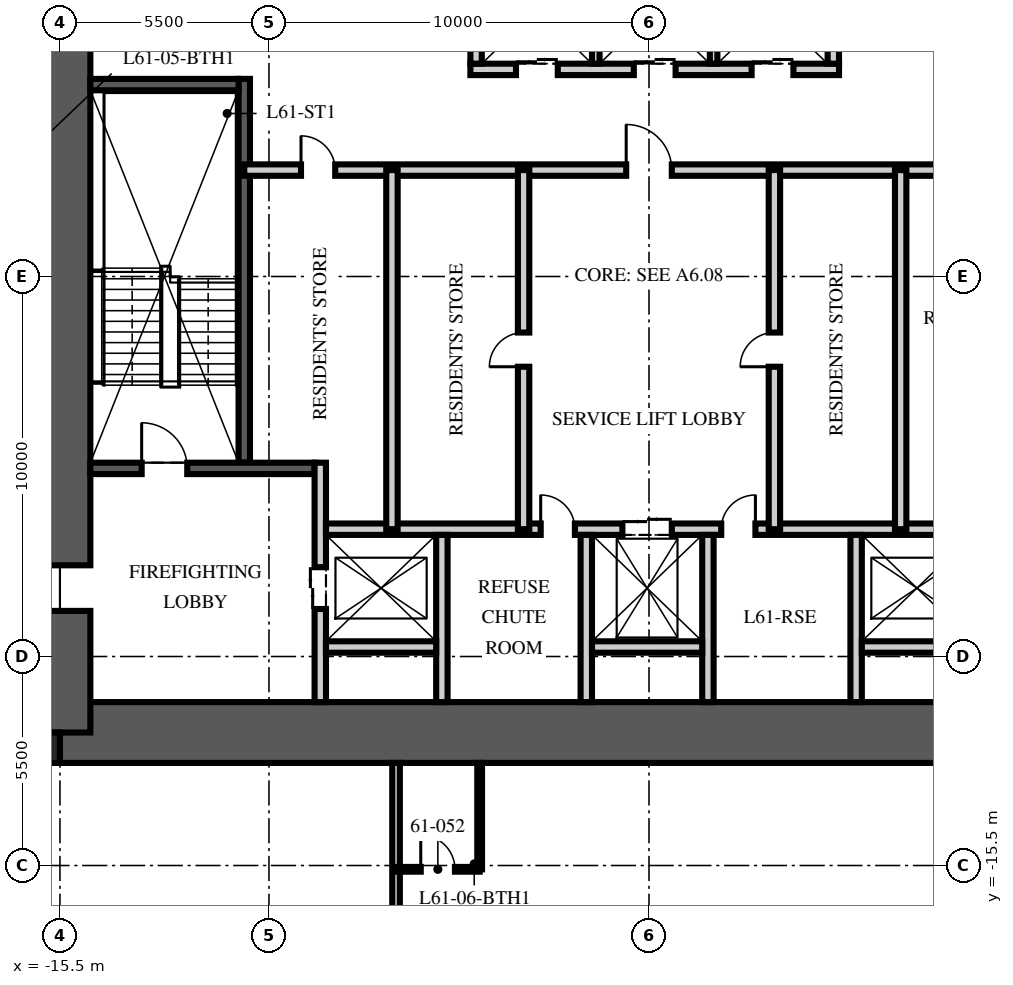
"""IFC4 building model, lengths in metres.
Left out: names, types, materials, properties, quantities, classifications, styles, units other than length and angle.
Written with IfcOpenShell. Run it as: python <this file> out.ifc"""

import sys

from ifc_helpers import new_model, si_unit, direction, frame, frame_2d, origin, origin_2d, place, context, subcontext, project, spatial, rectangle, extrude, element, fill, save


model = new_model("IFC4")
c1 = context("Model", 3, precision=1e-05, world=origin(), true_north=direction((0.0, 1.0)))
c2 = subcontext(c1, "Body", "Model", "MODEL_VIEW")
j1 = project(units=[si_unit("LENGTHUNIT", "METRE"), si_unit("PLANEANGLEUNIT", "RADIAN")], contexts=[c1])
p1 = place(None, origin())
s1 = spatial("IfcSite", under=j1, at=p1, CompositionType="ELEMENT")
p2 = place(p1, origin())
s2 = spatial("IfcBuilding", under=s1, at=p2, CompositionType="ELEMENT")
p3 = place(p2, frame((0.0, 0.0, 244.5)))
s3 = spatial("IfcBuildingStorey", under=s2, at=p3, CompositionType="ELEMENT", Elevation=244.5)
p4 = place(p3, frame((-15.5, -12.0, -0.25), z_axis=(0.0, 0.0, 1.0), x_axis=(1.0, 0.0, 0.0)))
e1 = element("IfcWall", 1, at=p4, inside=s3, PredefinedType="SHEAR", context=c2, shape_type="SweptSolid", body=[
    extrude(rectangle(XDim=31.0, YDim=1.6, at=frame_2d((15.5, 0.0))), origin(), (0.0, 0.0, 1.0), 3.75),
])
p5 = place(p3, frame((-15.5, -12.0, -0.25), z_axis=(0.0, 0.0, 1.0), x_axis=(0.0, 1.0, 0.0)))
e2 = element("IfcWall", 2, at=p5, inside=s3, PredefinedType="SHEAR", context=c2, shape_type="SweptSolid", body=[
    extrude(rectangle(XDim=24.0, YDim=1.6, at=frame_2d((12.0, 0.0))), origin(), (0.0, 0.0, 1.0), 3.75),
])
p6 = place(p5, frame((3.2, 0.0, 0.25)))
e3 = element("IfcOpeningElement", 3, at=p6, cuts=e2, PredefinedType="OPENING", context=c2, shape_type="SweptSolid", body=[
    extrude(rectangle(XDim=1.2, YDim=2.1, at=frame_2d((0.6, 1.05))), frame((0.0, 0.81, 0.0), z_axis=(0.0, -1.0, 0.0), x_axis=(1.0, 0.0, 0.0)), (0.0, 0.0, 1.0), 1.62),
])
p7 = place(p5, frame((19.3, 0.0, 0.25)))
e4 = element("IfcOpeningElement", 4, at=p7, cuts=e2, PredefinedType="OPENING", context=c2, shape_type="SweptSolid", body=[
    extrude(rectangle(XDim=1.8, YDim=2.1, at=frame_2d((0.9, 1.05))), frame((0.0, 0.81, 0.0), z_axis=(0.0, -1.0, 0.0), x_axis=(1.0, 0.0, 0.0)), (0.0, 0.0, 1.0), 1.62),
])
p8 = place(p3, frame((-15.9, -12.4, -0.25), z_axis=(0.0, 0.0, 1.0), x_axis=(1.0, 0.0, 0.0)))
e5 = element("IfcColumn", 5, at=p8, inside=s3, PredefinedType="COLUMN", context=c2, shape_type="SweptSolid", body=[
    extrude(rectangle(XDim=0.8, YDim=0.8, at=origin_2d()), origin(), (0.0, 0.0, 1.0), 3.75),
])
p9 = place(p3, frame((-10.65, -4.9, 0.0), z_axis=(0.0, 0.0, 1.0), x_axis=(0.0, 1.0, 0.0)))
e6 = element("IfcWall", 6, at=p9, inside=s3, PredefinedType="SOLIDWALL", context=c2, shape_type="SweptSolid", body=[
    extrude(rectangle(XDim=10.1, YDim=0.3, at=frame_2d((5.05, 0.0))), origin(), (0.0, 0.0, 1.0), 3.5),
])
p10 = place(p3, frame((-14.7, -5.05, 0.0), z_axis=(0.0, 0.0, 1.0), x_axis=(1.0, 0.0, 0.0)))
e7 = element("IfcWall", 7, at=p10, inside=s3, PredefinedType="SOLIDWALL", context=c2, shape_type="SweptSolid", body=[
    extrude(rectangle(XDim=5.9, YDim=0.3, at=frame_2d((2.95, 0.0))), origin(), (0.0, 0.0, 1.0), 3.5),
])
p11 = place(p10, frame((1.35, 0.0, 0.0)))
e8 = element("IfcOpeningElement", 8, at=p11, cuts=e7, PredefinedType="OPENING", context=c2, shape_type="SweptSolid", body=[
    extrude(rectangle(XDim=1.2, YDim=2.1, at=frame_2d((0.6, 1.05))), frame((0.0, 0.16, 0.0), z_axis=(0.0, -1.0, 0.0), x_axis=(1.0, 0.0, 0.0)), (0.0, 0.0, 1.0), 0.32),
])
p12 = place(p3, frame((-14.7, 5.05, 0.0), z_axis=(0.0, 0.0, 1.0), x_axis=(1.0, 0.0, 0.0)))
e9 = element("IfcWall", 9, at=p12, inside=s3, PredefinedType="SOLIDWALL", context=c2, shape_type="SweptSolid", body=[
    extrude(rectangle(XDim=3.9, YDim=0.3, at=frame_2d((1.95, 0.0))), origin(), (0.0, 0.0, 1.0), 3.5),
])
p13 = place(p3, frame((-8.65, -11.2, 0.0), z_axis=(0.0, 0.0, 1.0), x_axis=(0.0, 1.0, 0.0)))
e10 = element("IfcWall", 10, at=p13, inside=s3, PredefinedType="PARTITIONING", context=c2, shape_type="SweptSolid", body=[
    extrude(rectangle(XDim=6.3, YDim=0.3, at=frame_2d((3.15, 0.0))), origin(), (0.0, 0.0, 1.0), 3.5),
])
p14 = place(p13, frame((2.45, 0.0, 0.0)))
e11 = element("IfcOpeningElement", 11, at=p14, cuts=e10, PredefinedType="OPENING", context=c2, shape_type="SweptSolid", body=[
    extrude(rectangle(XDim=1.1, YDim=2.1, at=frame_2d((0.55, 1.05))), frame((0.0, 0.16, 0.0), z_axis=(0.0, -1.0, 0.0), x_axis=(1.0, 0.0, 0.0)), (0.0, 0.0, 1.0), 0.32),
])
p15 = place(p3, frame((-8.5, -6.65, 0.0), z_axis=(0.0, 0.0, 1.0), x_axis=(1.0, 0.0, 0.0)))
e12 = element("IfcWall", 12, at=p15, inside=s3, PredefinedType="PARTITIONING", context=c2, shape_type="SweptSolid", body=[
    extrude(rectangle(XDim=17.0, YDim=0.3, at=frame_2d((8.5, 0.0))), origin(), (0.0, 0.0, 1.0), 3.5),
])
p16 = place(p15, frame((7.8, 0.0, 0.0)))
e13 = element("IfcOpeningElement", 13, at=p16, cuts=e12, PredefinedType="OPENING", context=c2, shape_type="SweptSolid", body=[
    extrude(rectangle(XDim=1.3, YDim=2.4, at=frame_2d((0.65, 1.2))), frame((0.0, 0.16, 0.0), z_axis=(0.0, -1.0, 0.0), x_axis=(1.0, 0.0, 0.0)), (0.0, 0.0, 1.0), 0.32),
])
p17 = place(p15, frame((5.65, 0.0, 0.0)))
e14 = element("IfcOpeningElement", 14, at=p17, cuts=e12, PredefinedType="OPENING", context=c2, shape_type="SweptSolid", body=[
    extrude(rectangle(XDim=0.9, YDim=2.1, at=frame_2d((0.45, 1.05))), frame((0.0, 0.16, 0.0), z_axis=(0.0, -1.0, 0.0), x_axis=(1.0, 0.0, 0.0)), (0.0, 0.0, 1.0), 0.32),
])
p18 = place(p15, frame((10.4, 0.0, 0.0)))
e15 = element("IfcOpeningElement", 15, at=p18, cuts=e12, PredefinedType="OPENING", context=c2, shape_type="SweptSolid", body=[
    extrude(rectangle(XDim=0.9, YDim=2.1, at=frame_2d((0.45, 1.05))), frame((0.0, 0.16, 0.0), z_axis=(0.0, -1.0, 0.0), x_axis=(1.0, 0.0, 0.0)), (0.0, 0.0, 1.0), 0.32),
])
for number, where, z_axis, x_axis in (
    (16, (-5.45, -11.2, 0.0), (0.0, 0.0, 1.0), (0.0, 1.0, 0.0)),
    (17, (-1.65, -11.2, 0.0), (0.0, 0.0, 1.0), (0.0, 1.0, 0.0)),
    (18, (1.55, -11.2, 0.0), (0.0, 0.0, 1.0), (0.0, 1.0, 0.0)),
    (19, (5.45, -11.2, 0.0), (0.0, 0.0, 1.0), (0.0, 1.0, 0.0)),
):
    element("IfcWall", number, at=place(p3, frame(where, z_axis=z_axis, x_axis=x_axis)), inside=s3, PredefinedType="PARTITIONING", context=c2, shape_type="SweptSolid", body=[
        extrude(rectangle(XDim=4.4, YDim=0.3, at=frame_2d((2.2, 0.0))), origin(), (0.0, 0.0, 1.0), 3.5),
    ])
for number, where, z_axis, x_axis in (
    (20, (-8.5, -9.75, 0.0), (0.0, 0.0, 1.0), (1.0, 0.0, 0.0)),
    (21, (-1.5, -9.75, 0.0), (0.0, 0.0, 1.0), (1.0, 0.0, 0.0)),
    (22, (5.6, -9.75, 0.0), (0.0, 0.0, 1.0), (1.0, 0.0, 0.0)),
):
    element("IfcWall", number, at=place(p3, frame(where, z_axis=z_axis, x_axis=x_axis)), inside=s3, PredefinedType="PARTITIONING", context=c2, shape_type="SweptSolid", body=[
        extrude(rectangle(XDim=2.9, YDim=0.3, at=frame_2d((1.45, 0.0))), origin(), (0.0, 0.0, 1.0), 3.5),
    ])
p19 = place(p3, frame((-4.7, 5.45, 0.0), z_axis=(0.0, 0.0, 1.0), x_axis=(1.0, 0.0, 0.0)))
e23 = element("IfcWall", 23, at=p19, inside=s3, PredefinedType="PARTITIONING", context=c2, shape_type="SweptSolid", body=[
    extrude(rectangle(XDim=9.7, YDim=0.3, at=frame_2d((4.85, 0.0))), origin(), (0.0, 0.0, 1.0), 3.5),
])
p20 = place(p19, frame((1.2, 0.0, 0.0)))
e24 = element("IfcOpeningElement", 24, at=p20, cuts=e23, PredefinedType="OPENING", context=c2, shape_type="SweptSolid", body=[
    extrude(rectangle(XDim=1.1, YDim=2.1, at=frame_2d((0.55, 1.05))), frame((0.0, 0.16, 0.0), z_axis=(0.0, -1.0, 0.0), x_axis=(1.0, 0.0, 0.0)), (0.0, 0.0, 1.0), 0.32),
])
p21 = place(p19, frame((4.3, 0.0, 0.0)))
e25 = element("IfcOpeningElement", 25, at=p21, cuts=e23, PredefinedType="OPENING", context=c2, shape_type="SweptSolid", body=[
    extrude(rectangle(XDim=1.1, YDim=2.1, at=frame_2d((0.55, 1.05))), frame((0.0, 0.16, 0.0), z_axis=(0.0, -1.0, 0.0), x_axis=(1.0, 0.0, 0.0)), (0.0, 0.0, 1.0), 0.32),
])
p22 = place(p19, frame((7.4, 0.0, 0.0)))
e26 = element("IfcOpeningElement", 26, at=p22, cuts=e23, PredefinedType="OPENING", context=c2, shape_type="SweptSolid", body=[
    extrude(rectangle(XDim=1.1, YDim=2.1, at=frame_2d((0.55, 1.05))), frame((0.0, 0.16, 0.0), z_axis=(0.0, -1.0, 0.0), x_axis=(1.0, 0.0, 0.0)), (0.0, 0.0, 1.0), 0.32),
])
for number, where, z_axis, x_axis in (
    (27, (-4.55, 5.6, 0.0), (0.0, 0.0, 1.0), (0.0, 1.0, 0.0)),
    (28, (4.85, 5.6, 0.0), (0.0, 0.0, 1.0), (0.0, 1.0, 0.0)),
):
    element("IfcWall", number, at=place(p3, frame(where, z_axis=z_axis, x_axis=x_axis)), inside=s3, PredefinedType="PARTITIONING", context=c2, shape_type="SweptSolid", body=[
        extrude(rectangle(XDim=2.8, YDim=0.3, at=frame_2d((1.4, 0.0))), origin(), (0.0, 0.0, 1.0), 3.5),
    ])
for number, where, z_axis, x_axis in (
    (29, (-1.4, 5.6, 0.0), (0.0, 0.0, 1.0), (0.0, 1.0, 0.0)),
    (30, (1.7, 5.6, 0.0), (0.0, 0.0, 1.0), (0.0, 1.0, 0.0)),
):
    element("IfcWall", number, at=place(p3, frame(where, z_axis=z_axis, x_axis=x_axis)), inside=s3, PredefinedType="PARTITIONING", context=c2, shape_type="SweptSolid", body=[
        extrude(rectangle(XDim=2.8, YDim=0.2, at=frame_2d((1.4, 0.0))), origin(), (0.0, 0.0, 1.0), 3.5),
    ])
p23 = place(p3, frame((-10.65, 2.8, 0.0), z_axis=(0.0, 0.0, 1.0), x_axis=(1.0, 0.0, 0.0)))
e31 = element("IfcWall", 31, at=p23, inside=s3, PredefinedType="PARTITIONING", context=c2, shape_type="SweptSolid", body=[
    extrude(rectangle(XDim=21.3, YDim=0.3, at=frame_2d((10.65, 0.0))), origin(), (0.0, 0.0, 1.0), 3.5),
])
p24 = place(p23, frame((10.05, 0.0, 0.0)))
e32 = element("IfcOpeningElement", 32, at=p24, cuts=e31, PredefinedType="OPENING", context=c2, shape_type="SweptSolid", body=[
    extrude(rectangle(XDim=1.2, YDim=2.1, at=frame_2d((0.6, 1.05))), frame((0.0, 0.16, 0.0), z_axis=(0.0, -1.0, 0.0), x_axis=(1.0, 0.0, 0.0)), (0.0, 0.0, 1.0), 0.32),
])
p25 = place(p23, frame((1.493, 0.0, 0.0)))
e33 = element("IfcOpeningElement", 33, at=p25, cuts=e31, PredefinedType="OPENING", context=c2, shape_type="SweptSolid", body=[
    extrude(rectangle(XDim=0.9, YDim=2.1, at=frame_2d((0.45, 1.05))), frame((0.0, 0.16, 0.0), z_axis=(0.0, -1.0, 0.0), x_axis=(1.0, 0.0, 0.0)), (0.0, 0.0, 1.0), 0.32),
])
p26 = place(p23, frame((18.836, 0.0, 0.0)))
e34 = element("IfcOpeningElement", 34, at=p26, cuts=e31, PredefinedType="OPENING", context=c2, shape_type="SweptSolid", body=[
    extrude(rectangle(XDim=0.9, YDim=2.1, at=frame_2d((0.45, 1.05))), frame((0.0, 0.16, 0.0), z_axis=(0.0, -1.0, 0.0), x_axis=(1.0, 0.0, 0.0)), (0.0, 0.0, 1.0), 0.32),
])
p27 = place(p3, frame((-3.3, -6.65, 0.0), z_axis=(0.0, 0.0, 1.0), x_axis=(0.0, 1.0, 0.0)))
e35 = element("IfcWall", 35, at=p27, inside=s3, PredefinedType="PARTITIONING", context=c2, shape_type="SweptSolid", body=[
    extrude(rectangle(XDim=9.45, YDim=0.3, at=frame_2d((4.725, 0.0))), origin(), (0.0, 0.0, 1.0), 3.5),
])
p28 = place(p27, frame((4.275, 0.0, 0.0)))
e36 = element("IfcOpeningElement", 36, at=p28, cuts=e35, PredefinedType="OPENING", context=c2, shape_type="SweptSolid", body=[
    extrude(rectangle(XDim=0.9, YDim=2.1, at=frame_2d((0.45, 1.05))), frame((0.0, 0.16, 0.0), z_axis=(0.0, -1.0, 0.0), x_axis=(1.0, 0.0, 0.0)), (0.0, 0.0, 1.0), 0.32),
])
p29 = place(p3, frame((3.3, -6.65, 0.0), z_axis=(0.0, 0.0, 1.0), x_axis=(0.0, 1.0, 0.0)))
e37 = element("IfcWall", 37, at=p29, inside=s3, PredefinedType="PARTITIONING", context=c2, shape_type="SweptSolid", body=[
    extrude(rectangle(XDim=9.45, YDim=0.3, at=frame_2d((4.725, 0.0))), origin(), (0.0, 0.0, 1.0), 3.5),
])
p30 = place(p29, frame((4.275, 0.0, 0.0)))
e38 = element("IfcOpeningElement", 38, at=p30, cuts=e37, PredefinedType="OPENING", context=c2, shape_type="SweptSolid", body=[
    extrude(rectangle(XDim=0.9, YDim=2.1, at=frame_2d((0.45, 1.05))), frame((0.0, 0.16, 0.0), z_axis=(0.0, -1.0, 0.0), x_axis=(1.0, 0.0, 0.0)), (0.0, 0.0, 1.0), 0.32),
])
for number, where, z_axis, x_axis in (
    (39, (-6.764, -6.65, 0.0), (0.0, 0.0, 1.0), (0.0, 1.0, 0.0)),
    (40, (6.622, -6.65, 0.0), (0.0, 0.0, 1.0), (0.0, 1.0, 0.0)),
):
    element("IfcWall", number, at=place(p3, frame(where, z_axis=z_axis, x_axis=x_axis)), inside=s3, PredefinedType="PARTITIONING", context=c2, shape_type="SweptSolid", body=[
        extrude(rectangle(XDim=9.45, YDim=0.3, at=frame_2d((4.725, 0.0))), origin(), (0.0, 0.0, 1.0), 3.5),
    ])
p31 = place(p3, frame((-6.656, -12.8, 0.0), z_axis=(0.0, 0.0, 1.0), x_axis=(0.0, -1.0, 0.0)))
e41 = element("IfcWall", 41, at=p31, inside=s3, PredefinedType="PARTITIONING", context=c2, shape_type="SweptSolid", body=[
    extrude(rectangle(XDim=12.9, YDim=0.2, at=frame_2d((6.45, 0.0))), origin(), (0.0, 0.0, 1.0), 2.91),
])
p32 = place(p3, frame((-6.656, -15.6, 0.0), z_axis=(0.0, 0.0, 1.0), x_axis=(1.0, 0.0, 0.0)))
e42 = element("IfcWall", 42, at=p32, inside=s3, PredefinedType="PARTITIONING", context=c2, shape_type="SweptSolid", body=[
    extrude(rectangle(XDim=2.2, YDim=0.125, at=frame_2d((1.1, 0.0))), origin(), (0.0, 0.0, 1.0), 3.5),
])
p33 = place(p32, frame((0.65, 0.0, 0.0)))
e43 = element("IfcOpeningElement", 43, at=p33, cuts=e42, PredefinedType="OPENING", context=c2, shape_type="SweptSolid", body=[
    extrude(rectangle(XDim=0.9, YDim=2.1, at=frame_2d((0.45, 1.05))), frame((0.0, 0.073, 0.0), z_axis=(0.0, -1.0, 0.0), x_axis=(1.0, 0.0, 0.0)), (0.0, 0.0, 1.0), 0.145),
])
p34 = place(p3, frame((-4.456, -12.8, 0.0), z_axis=(0.0, 0.0, 1.0), x_axis=(0.0, -1.0, 0.0)))
e44 = element("IfcWall", 44, at=p34, inside=s3, PredefinedType="PARTITIONING", context=c2, shape_type="SweptSolid", body=[
    extrude(rectangle(XDim=2.8, YDim=0.125, at=frame_2d((1.4, 0.0))), origin(), (0.0, 0.0, 1.0), 3.5),
])
p35 = place(p11, origin())
e45 = element("IfcDoor", 45, at=p35, inside=s3, OperationType="SINGLE_SWING_LEFT", PredefinedType="DOOR", context=c2, shape_type="SweptSolid", body=[
    extrude(rectangle(XDim=1.2, YDim=2.1, at=frame_2d((0.6, 1.05))), frame((0.0, 0.025, 0.0), z_axis=(0.0, -1.0, 0.0), x_axis=(1.0, 0.0, 0.0)), (0.0, 0.0, 1.0), 0.05),
])
fill(e8, e45)
p36 = place(p6, origin())
e46 = element("IfcDoor", 46, at=p36, inside=s3, OperationType="SINGLE_SWING_LEFT", PredefinedType="DOOR", context=c2, shape_type="SweptSolid", body=[
    extrude(rectangle(XDim=1.2, YDim=2.1, at=frame_2d((0.6, 1.05))), frame((0.0, 0.025, 0.0), z_axis=(0.0, -1.0, 0.0), x_axis=(1.0, 0.0, 0.0)), (0.0, 0.0, 1.0), 0.05),
])
fill(e3, e46)
p37 = place(p14, origin())
e47 = element("IfcDoor", 47, at=p37, inside=s3, OperationType="DOUBLE_DOOR_SLIDING", PredefinedType="DOOR", context=c2, shape_type="SweptSolid", body=[
    extrude(rectangle(XDim=1.1, YDim=2.1, at=frame_2d((0.55, 1.05))), frame((0.0, 0.025, 0.0), z_axis=(0.0, -1.0, 0.0), x_axis=(1.0, 0.0, 0.0)), (0.0, 0.0, 1.0), 0.05),
])
fill(e11, e47)
p38 = place(p20, origin())
e48 = element("IfcDoor", 48, at=p38, inside=s3, OperationType="DOUBLE_DOOR_SLIDING", PredefinedType="DOOR", context=c2, shape_type="SweptSolid", body=[
    extrude(rectangle(XDim=1.1, YDim=2.1, at=frame_2d((0.55, 1.05))), frame((0.0, 0.025, 0.0), z_axis=(0.0, -1.0, 0.0), x_axis=(1.0, 0.0, 0.0)), (0.0, 0.0, 1.0), 0.05),
])
fill(e24, e48)
p39 = place(p21, origin())
e49 = element("IfcDoor", 49, at=p39, inside=s3, OperationType="DOUBLE_DOOR_SLIDING", PredefinedType="DOOR", context=c2, shape_type="SweptSolid", body=[
    extrude(rectangle(XDim=1.1, YDim=2.1, at=frame_2d((0.55, 1.05))), frame((0.0, 0.025, 0.0), z_axis=(0.0, -1.0, 0.0), x_axis=(1.0, 0.0, 0.0)), (0.0, 0.0, 1.0), 0.05),
])
fill(e25, e49)
p40 = place(p22, origin())
e50 = element("IfcDoor", 50, at=p40, inside=s3, OperationType="DOUBLE_DOOR_SLIDING", PredefinedType="DOOR", context=c2, shape_type="SweptSolid", body=[
    extrude(rectangle(XDim=1.1, YDim=2.1, at=frame_2d((0.55, 1.05))), frame((0.0, 0.025, 0.0), z_axis=(0.0, -1.0, 0.0), x_axis=(1.0, 0.0, 0.0)), (0.0, 0.0, 1.0), 0.05),
])
fill(e26, e50)
p41 = place(p16, origin())
e51 = element("IfcDoor", 51, at=p41, inside=s3, OperationType="DOUBLE_DOOR_SLIDING", PredefinedType="DOOR", context=c2, shape_type="SweptSolid", body=[
    extrude(rectangle(XDim=1.3, YDim=2.4, at=frame_2d((0.65, 1.2))), frame((0.0, 0.025, 0.0), z_axis=(0.0, -1.0, 0.0), x_axis=(1.0, 0.0, 0.0)), (0.0, 0.0, 1.0), 0.05),
])
fill(e13, e51)
p42 = place(p24, origin())
e52 = element("IfcDoor", 52, at=p42, inside=s3, OperationType="SINGLE_SWING_LEFT", PredefinedType="DOOR", context=c2, shape_type="SweptSolid", body=[
    extrude(rectangle(XDim=1.2, YDim=2.1, at=frame_2d((0.6, 1.05))), frame((0.0, 0.025, 0.0), z_axis=(0.0, -1.0, 0.0), x_axis=(1.0, 0.0, 0.0)), (0.0, 0.0, 1.0), 0.05),
])
fill(e32, e52)
p43 = place(p17, origin())
e53 = element("IfcDoor", 53, at=p43, inside=s3, OperationType="SINGLE_SWING_LEFT", PredefinedType="DOOR", context=c2, shape_type="SweptSolid", body=[
    extrude(rectangle(XDim=0.9, YDim=2.1, at=frame_2d((0.45, 1.05))), frame((0.0, 0.025, 0.0), z_axis=(0.0, -1.0, 0.0), x_axis=(1.0, 0.0, 0.0)), (0.0, 0.0, 1.0), 0.05),
])
fill(e14, e53)
p44 = place(p18, origin())
e54 = element("IfcDoor", 54, at=p44, inside=s3, OperationType="SINGLE_SWING_RIGHT", PredefinedType="DOOR", context=c2, shape_type="SweptSolid", body=[
    extrude(rectangle(XDim=0.9, YDim=2.1, at=frame_2d((0.45, 1.05))), frame((0.0, 0.025, 0.0), z_axis=(0.0, -1.0, 0.0), x_axis=(1.0, 0.0, 0.0)), (0.0, 0.0, 1.0), 0.05),
])
fill(e15, e54)
p45 = place(p28, origin())
e55 = element("IfcDoor", 55, at=p45, inside=s3, OperationType="SINGLE_SWING_LEFT", PredefinedType="DOOR", context=c2, shape_type="SweptSolid", body=[
    extrude(rectangle(XDim=0.9, YDim=2.1, at=frame_2d((0.45, 1.05))), frame((0.0, 0.025, 0.0), z_axis=(0.0, -1.0, 0.0), x_axis=(1.0, 0.0, 0.0)), (0.0, 0.0, 1.0), 0.05),
])
fill(e36, e55)
p46 = place(p25, origin())
e56 = element("IfcDoor", 56, at=p46, inside=s3, OperationType="SINGLE_SWING_LEFT", PredefinedType="DOOR", context=c2, shape_type="SweptSolid", body=[
    extrude(rectangle(XDim=0.9, YDim=2.1, at=frame_2d((0.45, 1.05))), frame((0.0, 0.025, 0.0), z_axis=(0.0, -1.0, 0.0), x_axis=(1.0, 0.0, 0.0)), (0.0, 0.0, 1.0), 0.05),
])
fill(e33, e56)
p47 = place(p30, origin())
e57 = element("IfcDoor", 57, at=p47, inside=s3, OperationType="SINGLE_SWING_LEFT", PredefinedType="DOOR", context=c2, shape_type="SweptSolid", body=[
    extrude(rectangle(XDim=0.9, YDim=2.1, at=frame_2d((0.45, 1.05))), frame((0.0, 0.025, 0.0), z_axis=(0.0, -1.0, 0.0), x_axis=(1.0, 0.0, 0.0)), (0.0, 0.0, 1.0), 0.05),
])
fill(e38, e57)
p48 = place(p33, origin())
e58 = element("IfcDoor", 58, at=p48, inside=s3, OperationType="SINGLE_SWING_LEFT", PredefinedType="DOOR", context=c2, shape_type="SweptSolid", body=[
    extrude(rectangle(XDim=0.9, YDim=2.1, at=frame_2d((0.45, 1.05))), frame((0.0, 0.025, 0.0), z_axis=(0.0, -1.0, 0.0), x_axis=(1.0, 0.0, 0.0)), (0.0, 0.0, 1.0), 0.05),
])
fill(e43, e58)
save(model, sys.argv[1])
